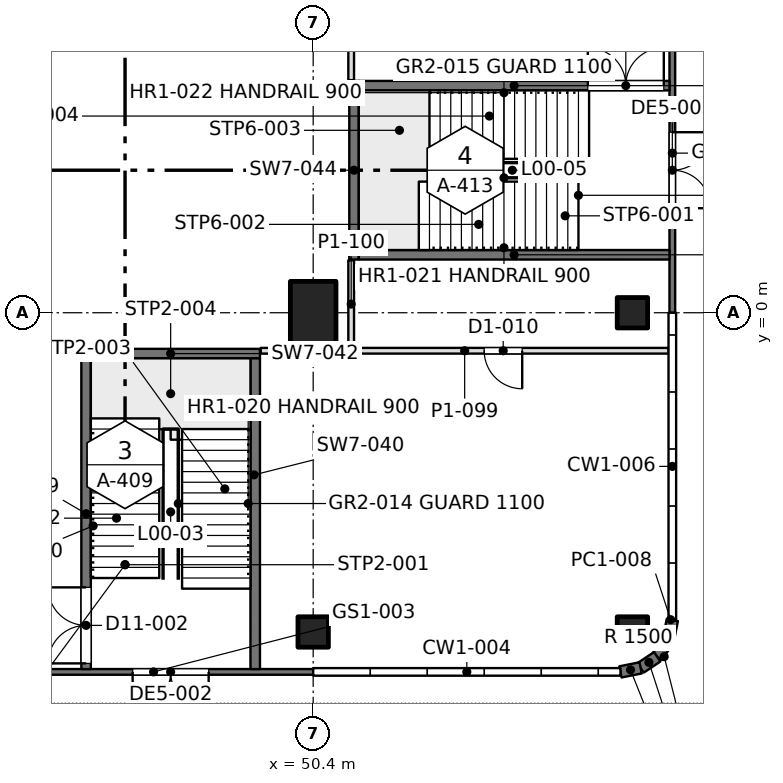
"""IFC4 building model, lengths in metres.
Left out: names, types, materials, properties, quantities, classifications, styles, units other than length and angle.
Written with IfcOpenShell. Run it as: python <this file> out.ifc"""

import sys

from ifc_helpers import new_model, si_unit, direction, frame, frame_2d, origin, origin_2d, place, context, subcontext, project, spatial, rectangle, extrude, element, fill, save


model = new_model("IFC4")
c1 = context("Model", 3, precision=1e-05, world=origin(), true_north=direction((0.0, 1.0)))
c2 = subcontext(c1, "Body", "Model", "MODEL_VIEW")
j1 = project(units=[si_unit("LENGTHUNIT", "METRE"), si_unit("PLANEANGLEUNIT", "RADIAN")], contexts=[c1])
p1 = place(None, origin())
s1 = spatial("IfcSite", under=j1, at=p1, CompositionType="ELEMENT")
p2 = place(p1, origin())
s2 = spatial("IfcBuilding", under=s1, at=p2, CompositionType="ELEMENT")
p3 = place(p2, origin())
s3 = spatial("IfcBuildingStorey", under=s2, at=p3, CompositionType="ELEMENT", Elevation=0.0)
p4 = place(p3, frame((50.4, -8.4, 0.0), z_axis=(0.0, 0.0, 1.0), x_axis=(1.0, 0.0, 0.0)))
e1 = element("IfcColumn", 1, at=p4, inside=s3, PredefinedType="COLUMN", context=c2, shape_type="SweptSolid", body=[
    extrude(rectangle(XDim=0.8, YDim=0.8, at=origin_2d()), origin(), (0.0, 0.0, 1.0), 5.4),
])
p5 = place(p3, frame((50.4, 0.0, 0.0), z_axis=(0.0, 0.0, 1.0), x_axis=(1.0, 0.0, 0.0)))
e2 = element("IfcColumn", 2, at=p5, inside=s3, PredefinedType="COLUMN", context=c2, shape_type="SweptSolid", body=[
    extrude(rectangle(XDim=1.2, YDim=1.65, at=origin_2d()), origin(), (0.0, 0.0, 1.0), 5.4),
])
for number, where, z_axis, x_axis in (
    (3, (58.8, -8.4, 0.0), (0.0, 0.0, 1.0), (1.0, 0.0, 0.0)),
    (4, (58.8, 0.0, 0.0), (0.0, 0.0, 1.0), (1.0, 0.0, 0.0)),
):
    element("IfcColumn", number, at=place(p3, frame(where, z_axis=z_axis, x_axis=x_axis)), inside=s3, PredefinedType="COLUMN", context=c2, shape_type="SweptSolid", body=[
        extrude(rectangle(XDim=0.8, YDim=0.8, at=origin_2d()), origin(), (0.0, 0.0, 1.0), 5.4),
    ])
p6 = place(p3, frame((42.0, -9.45, 0.0), z_axis=(0.0, 0.0, 1.0), x_axis=(1.0, 0.0, 0.0)))
e5 = element("IfcWall", 5, at=p6, inside=s3, PredefinedType="SOLIDWALL", context=c2, shape_type="SweptSolid", body=[
    extrude(rectangle(XDim=8.4, YDim=0.15, at=frame_2d((4.2, 0.0))), origin(), (0.0, 0.0, 1.0), 5.2),
])
p7 = place(p6, frame((3.65, 0.0, 0.0)))
e6 = element("IfcOpeningElement", 6, at=p7, cuts=e5, PredefinedType="OPENING", context=c2, shape_type="SweptSolid", body=[
    extrude(rectangle(XDim=2.0, YDim=2.4, at=frame_2d((1.0, 1.2))), frame((0.0, 0.085, 0.0), z_axis=(0.0, -1.0, 0.0), x_axis=(1.0, 0.0, 0.0)), (0.0, 0.0, 1.0), 0.17),
])
p8 = place(p3, frame((59.85, 0.0, 0.0), z_axis=(0.0, 0.0, 1.0), x_axis=(0.0, 1.0, 0.0)))
e7 = element("IfcWall", 7, at=p8, inside=s3, PredefinedType="SOLIDWALL", context=c2, shape_type="SweptSolid", body=[
    extrude(rectangle(XDim=8.4, YDim=0.15, at=frame_2d((4.2, 0.0))), origin(), (0.0, 0.0, 1.0), 5.2),
])
p9 = place(p8, frame((2.75, 0.0, 0.0)))
e8 = element("IfcOpeningElement", 8, at=p9, cuts=e7, PredefinedType="OPENING", context=c2, shape_type="SweptSolid", body=[
    extrude(rectangle(XDim=2.0, YDim=2.4, at=frame_2d((1.0, 1.2))), frame((0.0, 0.085, 0.0), z_axis=(0.0, -1.0, 0.0), x_axis=(1.0, 0.0, 0.0)), (0.0, 0.0, 1.0), 0.17),
])
p10 = place(p3, frame((59.85, -8.085, 0.0), z_axis=(0.0, 0.0, 1.0), x_axis=(-0.1955082817, -0.980702050465, 0.0)))
e9 = element("IfcWall", 9, at=p10, inside=s3, PredefinedType="SOLIDWALL", context=c2, shape_type="SweptSolid", body=[
    extrude(rectangle(XDim=0.541, YDim=0.3, at=frame_2d((0.271, 0.0))), origin(), (0.0, 0.0, 1.0), 5.2),
])
p11 = place(p3, frame((59.744, -8.615, 0.0), z_axis=(0.0, 0.0, 1.0), x_axis=(-0.555236195849, -0.831692711774, 0.0)))
e10 = element("IfcWall", 10, at=p11, inside=s3, PredefinedType="SOLIDWALL", context=c2, shape_type="SweptSolid", body=[
    extrude(rectangle(XDim=0.525, YDim=0.3, at=frame_2d((0.263, 0.0))), origin(), (0.0, 0.0, 1.0), 5.2),
])
p12 = place(p3, frame((59.453, -9.052, 0.0), z_axis=(0.0, 0.0, 1.0), x_axis=(-0.831621430339, -0.55534295404, 0.0)))
e11 = element("IfcWall", 11, at=p12, inside=s3, PredefinedType="SOLIDWALL", context=c2, shape_type="SweptSolid", body=[
    extrude(rectangle(XDim=0.526, YDim=0.3, at=frame_2d((0.263, 0.0))), origin(), (0.0, 0.0, 1.0), 5.2),
])
p13 = place(p3, frame((59.015, -9.344, 0.0), z_axis=(0.0, 0.0, 1.0), x_axis=(-0.980788534345, -0.195073962632, 0.0)))
e12 = element("IfcWall", 12, at=p13, inside=s3, PredefinedType="SOLIDWALL", context=c2, shape_type="SweptSolid", body=[
    extrude(rectangle(XDim=0.541, YDim=0.3, at=frame_2d((0.271, 0.0))), origin(), (0.0, 0.0, 1.0), 5.2),
])
p14 = place(p3, frame((6.12, -1.0, 0.0), z_axis=(0.0, 0.0, 1.0), x_axis=(1.0, 0.0, 0.0)))
e13 = element("IfcWall", 13, at=p14, inside=s3, PredefinedType="PARTITIONING", context=c2, shape_type="SweptSolid", body=[
    extrude(rectangle(XDim=38.16, YDim=0.15, at=frame_2d((19.08, 0.0))), origin(), (0.0, 0.0, 1.0), 4.6),
])
p15 = place(p14, frame((13.98, 0.0, 0.0)))
e14 = element("IfcOpeningElement", 14, at=p15, cuts=e13, PredefinedType="OPENING", context=c2, shape_type="SweptSolid", body=[
    extrude(rectangle(XDim=1.8, YDim=2.2, at=frame_2d((0.9, 1.1))), frame((0.0, 0.085, 0.0), z_axis=(0.0, -1.0, 0.0), x_axis=(1.0, 0.0, 0.0)), (0.0, 0.0, 1.0), 0.17),
])
p16 = place(p14, frame((22.38, 0.0, 0.0)))
e15 = element("IfcOpeningElement", 15, at=p16, cuts=e13, PredefinedType="OPENING", context=c2, shape_type="SweptSolid", body=[
    extrude(rectangle(XDim=1.8, YDim=2.2, at=frame_2d((0.9, 1.1))), frame((0.0, 0.085, 0.0), z_axis=(0.0, -1.0, 0.0), x_axis=(1.0, 0.0, 0.0)), (0.0, 0.0, 1.0), 0.17),
])
p17 = place(p3, frame((49.02, -1.0, 0.0), z_axis=(0.0, 0.0, 1.0), x_axis=(1.0, 0.0, 0.0)))
e16 = element("IfcWall", 16, at=p17, inside=s3, PredefinedType="PARTITIONING", context=c2, shape_type="SweptSolid", body=[
    extrude(rectangle(XDim=10.732, YDim=0.15, at=frame_2d((5.366, 0.0))), origin(), (0.0, 0.0, 1.0), 4.6),
])
p18 = place(p17, frame((5.88, 0.0, 0.0)))
e17 = element("IfcOpeningElement", 17, at=p18, cuts=e16, PredefinedType="OPENING", context=c2, shape_type="SweptSolid", body=[
    extrude(rectangle(XDim=1.0, YDim=2.2, at=frame_2d((0.5, 1.1))), frame((0.0, 0.085, 0.0), z_axis=(0.0, -1.0, 0.0), x_axis=(1.0, 0.0, 0.0)), (0.0, 0.0, 1.0), 0.17),
])
p19 = place(p3, frame((51.4, -0.926, 0.0), z_axis=(0.0, 0.0, 1.0), x_axis=(0.0, 1.0, 0.0)))
e18 = element("IfcWall", 18, at=p19, inside=s3, PredefinedType="PARTITIONING", context=c2, shape_type="SweptSolid", body=[
    extrude(rectangle(XDim=2.306, YDim=0.15, at=frame_2d((1.153, 0.0))), origin(), (0.0, 0.0, 1.0), 4.6),
])
p20 = place(p3, frame((51.4, 6.12, 0.0), z_axis=(0.0, 0.0, 1.0), x_axis=(0.0, 1.0, 0.0)))
e19 = element("IfcWall", 19, at=p20, inside=s3, PredefinedType="PARTITIONING", context=c2, shape_type="SweptSolid", body=[
    extrude(rectangle(XDim=6.482, YDim=0.15, at=frame_2d((3.241, 0.0))), origin(), (0.0, 0.0, 1.0), 4.6),
])
p21 = place(p20, frame((3.88, 0.0, 0.0)))
e20 = element("IfcOpeningElement", 20, at=p21, cuts=e19, PredefinedType="OPENING", context=c2, shape_type="SweptSolid", body=[
    extrude(rectangle(XDim=1.0, YDim=2.2, at=frame_2d((0.5, 1.1))), frame((0.0, 0.085, 0.0), z_axis=(0.0, -1.0, 0.0), x_axis=(1.0, 0.0, 0.0)), (0.0, 0.0, 1.0), 0.17),
])
p22 = place(p3, frame((44.425, -9.376, 0.0), z_axis=(0.0, 0.0, 1.0), x_axis=(0.0, 1.0, 0.0)))
e21 = element("IfcWall", 21, at=p22, inside=s3, PredefinedType="SOLIDWALL", context=c2, shape_type="SweptSolid", body=[
    extrude(rectangle(XDim=8.176, YDim=0.25, at=frame_2d((4.088, 0.0))), origin(), (0.0, 0.0, 1.0), 5.4),
])
p23 = place(p22, frame((0.15, 0.0, 0.0)))
e22 = element("IfcOpeningElement", 22, at=p23, cuts=e21, PredefinedType="OPENING", context=c2, shape_type="SweptSolid", body=[
    extrude(rectangle(XDim=2.0, YDim=2.2, at=frame_2d((1.0, 1.1))), frame((0.0, 0.135, 0.0), z_axis=(0.0, -1.0, 0.0), x_axis=(1.0, 0.0, 0.0)), (0.0, 0.0, 1.0), 0.27),
])
p24 = place(p3, frame((48.875, -9.376, 0.0), z_axis=(0.0, 0.0, 1.0), x_axis=(0.0, 1.0, 0.0)))
e23 = element("IfcWall", 23, at=p24, inside=s3, PredefinedType="SOLIDWALL", context=c2, shape_type="SweptSolid", body=[
    extrude(rectangle(XDim=8.176, YDim=0.25, at=frame_2d((4.088, 0.0))), origin(), (0.0, 0.0, 1.0), 5.4),
])
p25 = place(p3, frame((44.3, -1.075, 0.0), z_axis=(0.0, 0.0, 1.0), x_axis=(1.0, 0.0, 0.0)))
e24 = element("IfcWall", 24, at=p25, inside=s3, PredefinedType="SOLIDWALL", context=c2, shape_type="SweptSolid", body=[
    extrude(rectangle(XDim=4.7, YDim=0.25, at=frame_2d((2.35, 0.0))), origin(), (0.0, 0.0, 1.0), 5.4),
])
p26 = place(p3, frame((59.776, 1.525, 0.0), z_axis=(0.0, 0.0, 1.0), x_axis=(-1.0, 0.0, 0.0)))
e25 = element("IfcWall", 25, at=p26, inside=s3, PredefinedType="SOLIDWALL", context=c2, shape_type="SweptSolid", body=[
    extrude(rectangle(XDim=8.176, YDim=0.25, at=frame_2d((4.088, 0.0))), origin(), (0.0, 0.0, 1.0), 5.4),
])
p27 = place(p3, frame((59.776, 5.975, 0.0), z_axis=(0.0, 0.0, 1.0), x_axis=(-1.0, 0.0, 0.0)))
e26 = element("IfcWall", 26, at=p27, inside=s3, PredefinedType="SOLIDWALL", context=c2, shape_type="SweptSolid", body=[
    extrude(rectangle(XDim=8.176, YDim=0.25, at=frame_2d((4.088, 0.0))), origin(), (0.0, 0.0, 1.0), 5.4),
])
p28 = place(p27, frame((0.15, 0.0, 0.0)))
e27 = element("IfcOpeningElement", 27, at=p28, cuts=e26, PredefinedType="OPENING", context=c2, shape_type="SweptSolid", body=[
    extrude(rectangle(XDim=2.0, YDim=2.2, at=frame_2d((1.0, 1.1))), frame((0.0, 0.135, 0.0), z_axis=(0.0, -1.0, 0.0), x_axis=(1.0, 0.0, 0.0)), (0.0, 0.0, 1.0), 0.27),
])
p29 = place(p3, frame((51.475, 1.4, 0.0), z_axis=(0.0, 0.0, 1.0), x_axis=(0.0, 1.0, 0.0)))
e28 = element("IfcWall", 28, at=p29, inside=s3, PredefinedType="SOLIDWALL", context=c2, shape_type="SweptSolid", body=[
    extrude(rectangle(XDim=4.7, YDim=0.25, at=frame_2d((2.35, 0.0))), origin(), (0.0, 0.0, 1.0), 5.4),
])
p30 = place(p7, frame((2.0, 0.0, 0.0), z_axis=(0.0, 0.0, 1.0), x_axis=(-1.0, 0.0, 0.0)))
e29 = element("IfcDoor", 29, at=p30, inside=s3, OperationType="DOUBLE_DOOR_SINGLE_SWING", PredefinedType="DOOR", context=c2, shape_type="SweptSolid", body=[
    extrude(rectangle(XDim=2.0, YDim=2.4, at=frame_2d((1.0, 1.2))), frame((0.0, 0.025, 0.0), z_axis=(0.0, -1.0, 0.0), x_axis=(1.0, 0.0, 0.0)), (0.0, 0.0, 1.0), 0.05),
])
fill(e6, e29)
p31 = place(p9, frame((2.0, 0.0, 0.0), z_axis=(0.0, 0.0, 1.0), x_axis=(-1.0, 0.0, 0.0)))
e30 = element("IfcDoor", 30, at=p31, inside=s3, OperationType="DOUBLE_DOOR_SINGLE_SWING", PredefinedType="DOOR", context=c2, shape_type="SweptSolid", body=[
    extrude(rectangle(XDim=2.0, YDim=2.4, at=frame_2d((1.0, 1.2))), frame((0.0, 0.025, 0.0), z_axis=(0.0, -1.0, 0.0), x_axis=(1.0, 0.0, 0.0)), (0.0, 0.0, 1.0), 0.05),
])
fill(e8, e30)
p32 = place(p18, frame((1.0, 0.0, 0.0), z_axis=(0.0, 0.0, 1.0), x_axis=(-1.0, 0.0, 0.0)))
e31 = element("IfcDoor", 31, at=p32, inside=s3, OperationType="SINGLE_SWING_LEFT", PredefinedType="DOOR", context=c2, shape_type="SweptSolid", body=[
    extrude(rectangle(XDim=1.0, YDim=2.2, at=frame_2d((0.5, 1.1))), frame((0.0, 0.025, 0.0), z_axis=(0.0, -1.0, 0.0), x_axis=(1.0, 0.0, 0.0)), (0.0, 0.0, 1.0), 0.05),
])
fill(e17, e31)
p33 = place(p23, origin())
e32 = element("IfcDoor", 32, at=p33, inside=s3, OperationType="DOUBLE_DOOR_SINGLE_SWING", PredefinedType="DOOR", context=c2, shape_type="SweptSolid", body=[
    extrude(rectangle(XDim=2.0, YDim=2.2, at=frame_2d((1.0, 1.1))), frame((0.0, 0.025, 0.0), z_axis=(0.0, -1.0, 0.0), x_axis=(1.0, 0.0, 0.0)), (0.0, 0.0, 1.0), 0.05),
])
fill(e22, e32)
p34 = place(p28, frame((2.0, 0.0, 0.0), z_axis=(0.0, 0.0, 1.0), x_axis=(-1.0, 0.0, 0.0)))
e33 = element("IfcDoor", 33, at=p34, inside=s3, OperationType="DOUBLE_DOOR_SINGLE_SWING", PredefinedType="DOOR", context=c2, shape_type="SweptSolid", body=[
    extrude(rectangle(XDim=2.0, YDim=2.2, at=frame_2d((1.0, 1.1))), frame((0.0, 0.025, 0.0), z_axis=(0.0, -1.0, 0.0), x_axis=(1.0, 0.0, 0.0)), (0.0, 0.0, 1.0), 0.05),
])
fill(e27, e33)
save(model, sys.argv[1])
